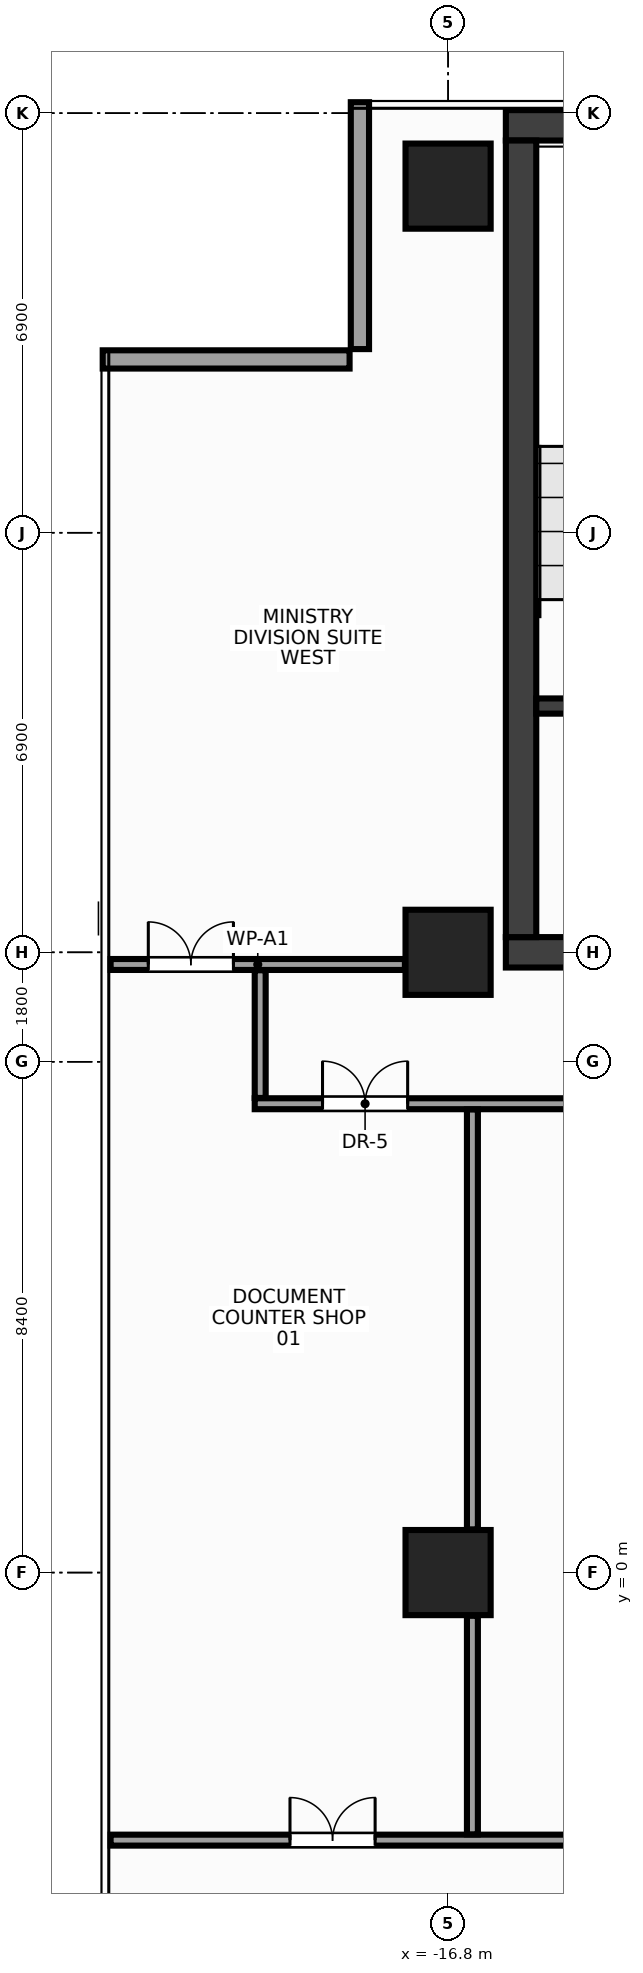
"""IFC4 building model, lengths in metres.
Left out: names, types, materials, properties, quantities, classifications, styles, units other than length and angle.
Written with IfcOpenShell. Run it as: python <this file> out.ifc"""

import sys

from ifc_helpers import new_model, si_unit, direction, frame, frame_2d, origin, origin_2d, place, context, subcontext, project, spatial, rectangle, extrude, source, transform, mapped, element, fill, save


model = new_model("IFC4")
c1 = context("Model", 3, precision=1e-05, world=origin(), true_north=direction((0.0, 1.0)))
c2 = subcontext(c1, "Body", "Model", "MODEL_VIEW")
j1 = project(units=[si_unit("LENGTHUNIT", "METRE"), si_unit("PLANEANGLEUNIT", "RADIAN")], contexts=[c1])
p1 = place(None, origin())
s1 = spatial("IfcSite", under=j1, at=p1, CompositionType="ELEMENT")
p2 = place(p1, origin())
s2 = spatial("IfcBuilding", under=s1, at=p2, CompositionType="ELEMENT")
p3 = place(p2, frame((0.0, 0.0, 264.8)))
s3 = spatial("IfcBuildingStorey", under=s2, at=p3, CompositionType="ELEMENT", Elevation=264.8)
m1 = source(origin(), c2, "Body", "SweptSolid", [
    extrude(rectangle(XDim=31.7, YDim=0.5, at=frame_2d((15.85, 0.0))), origin(), (0.0, 0.0, 1.0), 3.6),
])
p4 = place(p3, frame((-15.85, 23.8, 0.0), z_axis=(0.0, 0.0, 1.0), x_axis=(1.0, 0.0, 0.0)))
e1 = element("IfcWall", 1, at=p4, inside=s3, PredefinedType="SHEAR", context=c2, shape_type="MappedRepresentation", body=[
    mapped(m1, transform((0.0, 0.0, 0.0), x_axis=(1.0, 0.0, 0.0), y_axis=(0.0, 1.0, 0.0), z_axis=(0.0, 0.0, 1.0), scale=1.0)),
])
p5 = place(p3, frame((-15.85, 10.2, 0.0), z_axis=(0.0, 0.0, 1.0), x_axis=(1.0, 0.0, 0.0)))
e2 = element("IfcWall", 2, at=p5, inside=s3, PredefinedType="SHEAR", context=c2, shape_type="MappedRepresentation", body=[
    mapped(m1, transform((0.0, 0.0, 0.0), x_axis=(1.0, 0.0, 0.0), y_axis=(0.0, 1.0, 0.0), z_axis=(0.0, 0.0, 1.0), scale=1.0)),
])
p6 = place(p5, frame((1.7, 0.0, 0.0)))
e3 = element("IfcOpeningElement", 3, at=p6, cuts=e2, PredefinedType="OPENING", context=c2, shape_type="SweptSolid", body=[
    extrude(rectangle(XDim=1.6, YDim=2.15, at=frame_2d((0.8, 1.075))), frame((0.0, 0.262, 0.0), z_axis=(0.0, -1.0, 0.0), x_axis=(1.0, 0.0, 0.0)), (0.0, 0.0, 1.0), 0.524),
])
p7 = place(p5, frame((28.4, 0.0, 0.0)))
e4 = element("IfcOpeningElement", 4, at=p7, cuts=e2, PredefinedType="OPENING", context=c2, shape_type="SweptSolid", body=[
    extrude(rectangle(XDim=1.6, YDim=2.15, at=frame_2d((0.8, 1.075))), frame((0.0, 0.262, 0.0), z_axis=(0.0, -1.0, 0.0), x_axis=(1.0, 0.0, 0.0)), (0.0, 0.0, 1.0), 0.524),
])
p8 = place(p5, frame((15.1, 0.0, 0.0)))
e5 = element("IfcOpeningElement", 5, at=p8, cuts=e2, PredefinedType="OPENING", context=c2, shape_type="SweptSolid", body=[
    extrude(rectangle(XDim=1.5, YDim=2.2, at=frame_2d((0.75, 1.1))), frame((0.0, 0.262, 0.0), z_axis=(0.0, -1.0, 0.0), x_axis=(1.0, 0.0, 0.0)), (0.0, 0.0, 1.0), 0.524),
])
m2 = source(origin(), c2, "Body", "SweptSolid", [
    extrude(rectangle(XDim=13.1, YDim=0.5, at=frame_2d((6.55, 0.0))), origin(), (0.0, 0.0, 1.0), 3.6),
])
p9 = place(p3, frame((-15.6, 10.45, 0.0), z_axis=(0.0, 0.0, 1.0), x_axis=(0.0, 1.0, 0.0)))
e6 = element("IfcWall", 6, at=p9, inside=s3, PredefinedType="SHEAR", context=c2, shape_type="MappedRepresentation", body=[
    mapped(m2, transform((0.0, 0.0, 0.0), x_axis=(1.0, 0.0, 0.0), y_axis=(0.0, 1.0, 0.0), z_axis=(0.0, 0.0, 1.0), scale=1.0)),
])
m3 = source(origin(), c2, "Body", "SweptSolid", [
    extrude(rectangle(XDim=3.705, YDim=0.25, at=frame_2d((1.853, 0.0))), origin(), (0.0, 0.0, 1.0), 3.6),
])
p10 = place(p3, frame((-15.35, 14.25, 0.0), z_axis=(0.0, 0.0, 1.0), x_axis=(1.0, 0.0, 0.0)))
e7 = element("IfcWall", 7, at=p10, inside=s3, PredefinedType="SHEAR", context=c2, shape_type="MappedRepresentation", body=[
    mapped(m3, transform((0.0, 0.0, 0.0), x_axis=(1.0, 0.0, 0.0), y_axis=(0.0, 1.0, 0.0), z_axis=(0.0, 0.0, 1.0), scale=1.0)),
])
p11 = place(p10, frame((0.95, 0.0, 0.0)))
e8 = element("IfcOpeningElement", 8, at=p11, cuts=e7, PredefinedType="OPENING", context=c2, shape_type="SweptSolid", body=[
    extrude(rectangle(XDim=1.6, YDim=2.15, at=frame_2d((0.8, 1.075))), frame((0.0, 0.137, 0.0), z_axis=(0.0, -1.0, 0.0), x_axis=(1.0, 0.0, 0.0)), (0.0, 0.0, 1.0), 0.274),
])
m4 = source(origin(), c2, "Body", "SweptSolid", [
    extrude(rectangle(XDim=1.4, YDim=1.4, at=origin_2d()), origin(), (0.0, 0.0, 1.0), 3.6),
])
for number, where, z_axis, x_axis in (
    (9, (-16.8, 0.0, 0.0), (0.0, 0.0, 1.0), (1.0, 0.0, 0.0)),
    (10, (-16.8, 10.2, 0.0), (0.0, 0.0, 1.0), (1.0, 0.0, 0.0)),
    (11, (-16.8, 22.8, 0.0), (0.0, 0.0, 1.0), (1.0, 0.0, 0.0)),
):
    element("IfcColumn", number, at=place(p3, frame(where, z_axis=z_axis, x_axis=x_axis)), inside=s3, PredefinedType="COLUMN", context=c2, shape_type="MappedRepresentation", body=[
        mapped(m4, transform((0.0, 0.0, 0.0), x_axis=(1.0, 0.0, 0.0), y_axis=(0.0, 1.0, 0.0), z_axis=(0.0, 0.0, 1.0), scale=1.0)),
    ])
m5 = source(origin(), c2, "Body", "SweptSolid", [
    extrude(rectangle(XDim=4.06, YDim=0.3, at=frame_2d((2.03, 0.0))), origin(), (0.0, 0.0, 1.0), 2.75),
])
p12 = place(p3, frame((-18.25, 24.18, 0.0), z_axis=(0.0, 0.0, 1.0), x_axis=(0.0, -1.0, 0.0)))
e12 = element("IfcWall", 12, at=p12, inside=s3, PredefinedType="STANDARD", context=c2, shape_type="MappedRepresentation", body=[
    mapped(m5, transform((0.0, 0.0, 0.0), x_axis=(1.0, 0.0, 0.0), y_axis=(0.0, 1.0, 0.0), z_axis=(0.0, 0.0, 1.0), scale=1.0)),
])
m6 = source(origin(), c2, "Body", "SweptSolid", [
    extrude(rectangle(XDim=4.06, YDim=0.3, at=frame_2d((2.03, 0.0))), origin(), (0.0, 0.0, 1.0), 2.75),
])
p13 = place(p3, frame((-18.42, 19.95, 0.0), z_axis=(0.0, 0.0, 1.0), x_axis=(-1.0, 0.0, 0.0)))
e13 = element("IfcWall", 13, at=p13, inside=s3, PredefinedType="STANDARD", context=c2, shape_type="MappedRepresentation", body=[
    mapped(m6, transform((0.0, 0.0, 0.0), x_axis=(1.0, 0.0, 0.0), y_axis=(0.0, 1.0, 0.0), z_axis=(0.0, 0.0, 1.0), scale=1.0)),
])
m7 = source(origin(), c2, "Body", "SweptSolid", [
    extrude(rectangle(XDim=4.84, YDim=0.18, at=frame_2d((2.42, 0.0))), origin(), (0.0, 0.0, 1.0), 3.37),
])
p14 = place(p3, frame((-22.35, 10.0, 0.0), z_axis=(0.0, 0.0, 1.0), x_axis=(1.0, 0.0, 0.0)))
e14 = element("IfcWall", 14, at=p14, inside=s3, PredefinedType="PARTITIONING", context=c2, shape_type="MappedRepresentation", body=[
    mapped(m7, transform((0.0, 0.0, 0.0), x_axis=(1.0, 0.0, 0.0), y_axis=(0.0, 1.0, 0.0), z_axis=(0.0, 0.0, 1.0), scale=1.0)),
])
p15 = place(p14, frame((0.62, 0.0, 0.0)))
e15 = element("IfcOpeningElement", 15, at=p15, cuts=e14, PredefinedType="OPENING", context=c2, shape_type="SweptSolid", body=[
    extrude(rectangle(XDim=1.4, YDim=2.2, at=frame_2d((0.7, 1.1))), frame((0.0, 0.102, 0.0), z_axis=(0.0, -1.0, 0.0), x_axis=(1.0, 0.0, 0.0)), (0.0, 0.0, 1.0), 0.204),
])
m8 = source(origin(), c2, "Body", "SweptSolid", [
    extrude(rectangle(XDim=15.6, YDim=0.18, at=frame_2d((7.8, 0.0))), origin(), (0.0, 0.0, 1.0), 2.755),
])
p16 = place(p3, frame((-19.98, 7.71, 0.0), z_axis=(0.0, 0.0, 1.0), x_axis=(1.0, 0.0, 0.0)))
e16 = element("IfcWall", 16, at=p16, inside=s3, PredefinedType="PARTITIONING", context=c2, shape_type="MappedRepresentation", body=[
    mapped(m8, transform((0.0, 0.0, 0.0), x_axis=(1.0, 0.0, 0.0), y_axis=(0.0, 1.0, 0.0), z_axis=(0.0, 0.0, 1.0), scale=1.0)),
])
p17 = place(p16, frame((1.115, 0.0, 0.0)))
e17 = element("IfcOpeningElement", 17, at=p17, cuts=e16, PredefinedType="OPENING", context=c2, shape_type="SweptSolid", body=[
    extrude(rectangle(XDim=1.4, YDim=2.2, at=frame_2d((0.7, 1.1))), frame((0.0, 0.102, 0.0), z_axis=(0.0, -1.0, 0.0), x_axis=(1.0, 0.0, 0.0)), (0.0, 0.0, 1.0), 0.204),
])
p18 = place(p16, frame((7.68, 0.0, 0.0)))
e18 = element("IfcOpeningElement", 18, at=p18, cuts=e16, PredefinedType="OPENING", context=c2, shape_type="SweptSolid", body=[
    extrude(rectangle(XDim=1.4, YDim=2.2, at=frame_2d((0.7, 1.1))), frame((0.0, 0.102, 0.0), z_axis=(0.0, -1.0, 0.0), x_axis=(1.0, 0.0, 0.0)), (0.0, 0.0, 1.0), 0.204),
])
m9 = source(origin(), c2, "Body", "SweptSolid", [
    extrude(rectangle(XDim=2.1, YDim=0.18, at=frame_2d((1.05, 0.0))), origin(), (0.0, 0.0, 1.0), 3.37),
])
p19 = place(p3, frame((-19.89, 7.805, 0.0), z_axis=(0.0, 0.0, 1.0), x_axis=(0.0, 1.0, 0.0)))
e19 = element("IfcWall", 19, at=p19, inside=s3, PredefinedType="PARTITIONING", context=c2, shape_type="MappedRepresentation", body=[
    mapped(m9, transform((0.0, 0.0, 0.0), x_axis=(1.0, 0.0, 0.0), y_axis=(0.0, 1.0, 0.0), z_axis=(0.0, 0.0, 1.0), scale=1.0)),
])
m10 = source(origin(), c2, "Body", "SweptSolid", [
    extrude(rectangle(XDim=17.965, YDim=0.18, at=frame_2d((8.982, 0.0))), origin(), (0.0, 0.0, 1.0), 2.755),
])
p20 = place(p3, frame((-22.35, -4.4, 0.0), z_axis=(0.0, 0.0, 1.0), x_axis=(1.0, 0.0, 0.0)))
e20 = element("IfcWall", 20, at=p20, inside=s3, PredefinedType="PARTITIONING", context=c2, shape_type="MappedRepresentation", body=[
    mapped(m10, transform((0.0, 0.0, 0.0), x_axis=(1.0, 0.0, 0.0), y_axis=(0.0, 1.0, 0.0), z_axis=(0.0, 0.0, 1.0), scale=1.0)),
])
p21 = place(p20, frame((2.95, 0.0, 0.0)))
e21 = element("IfcOpeningElement", 21, at=p21, cuts=e20, PredefinedType="OPENING", context=c2, shape_type="SweptSolid", body=[
    extrude(rectangle(XDim=1.4, YDim=2.2, at=frame_2d((0.7, 1.1))), frame((0.0, 0.102, 0.0), z_axis=(0.0, -1.0, 0.0), x_axis=(1.0, 0.0, 0.0)), (0.0, 0.0, 1.0), 0.204),
])
m11 = source(origin(), c2, "Body", "SweptSolid", [
    extrude(rectangle(XDim=3.595, YDim=0.18, at=frame_2d((1.797, 0.0))), origin(), (0.0, 0.0, 1.0), 3.37),
])
p22 = place(p3, frame((-16.4, -4.305, 0.0), z_axis=(0.0, 0.0, 1.0), x_axis=(0.0, 1.0, 0.0)))
e22 = element("IfcWall", 22, at=p22, inside=s3, PredefinedType="PARTITIONING", context=c2, shape_type="MappedRepresentation", body=[
    mapped(m11, transform((0.0, 0.0, 0.0), x_axis=(1.0, 0.0, 0.0), y_axis=(0.0, 1.0, 0.0), z_axis=(0.0, 0.0, 1.0), scale=1.0)),
])
m12 = source(origin(), c2, "Body", "SweptSolid", [
    extrude(rectangle(XDim=6.905, YDim=0.18, at=frame_2d((3.453, 0.0))), origin(), (0.0, 0.0, 1.0), 2.655),
])
p23 = place(p3, frame((-16.4, 0.71, 0.0), z_axis=(0.0, 0.0, 1.0), x_axis=(0.0, 1.0, 0.0)))
e23 = element("IfcWall", 23, at=p23, inside=s3, PredefinedType="PARTITIONING", context=c2, shape_type="MappedRepresentation", body=[
    mapped(m12, transform((0.0, 0.0, 0.0), x_axis=(1.0, 0.0, 0.0), y_axis=(0.0, 1.0, 0.0), z_axis=(0.0, 0.0, 1.0), scale=1.0)),
])
m13 = source(origin(), c2, "Body", "SweptSolid", [
    extrude(rectangle(XDim=1.4, YDim=2.2, at=frame_2d((0.7, 1.1))), frame((0.0, 0.025, 0.0), z_axis=(0.0, -1.0, 0.0), x_axis=(1.0, 0.0, 0.0)), (0.0, 0.0, 1.0), 0.05),
])
p24 = place(p17, origin())
e24 = element("IfcDoor", 24, at=p24, inside=s3, OperationType="DOUBLE_DOOR_SINGLE_SWING", PredefinedType="DOOR", context=c2, shape_type="MappedRepresentation", body=[
    mapped(m13, transform((0.0, 0.0, 0.0), x_axis=(1.0, 0.0, 0.0), y_axis=(0.0, 1.0, 0.0), z_axis=(0.0, 0.0, 1.0), scale=1.0)),
])
fill(e17, e24)
p25 = place(p15, origin())
e25 = element("IfcDoor", 25, at=p25, inside=s3, OperationType="DOUBLE_DOOR_SINGLE_SWING", PredefinedType="DOOR", context=c2, shape_type="MappedRepresentation", body=[
    mapped(m13, transform((0.0, 0.0, 0.0), x_axis=(1.0, 0.0, 0.0), y_axis=(0.0, 1.0, 0.0), z_axis=(0.0, 0.0, 1.0), scale=1.0)),
])
fill(e15, e25)
p26 = place(p21, origin())
e26 = element("IfcDoor", 26, at=p26, inside=s3, OperationType="DOUBLE_DOOR_SINGLE_SWING", PredefinedType="DOOR", context=c2, shape_type="MappedRepresentation", body=[
    mapped(m13, transform((0.0, 0.0, 0.0), x_axis=(1.0, 0.0, 0.0), y_axis=(0.0, 1.0, 0.0), z_axis=(0.0, 0.0, 1.0), scale=1.0)),
])
fill(e21, e26)
save(model, sys.argv[1])
